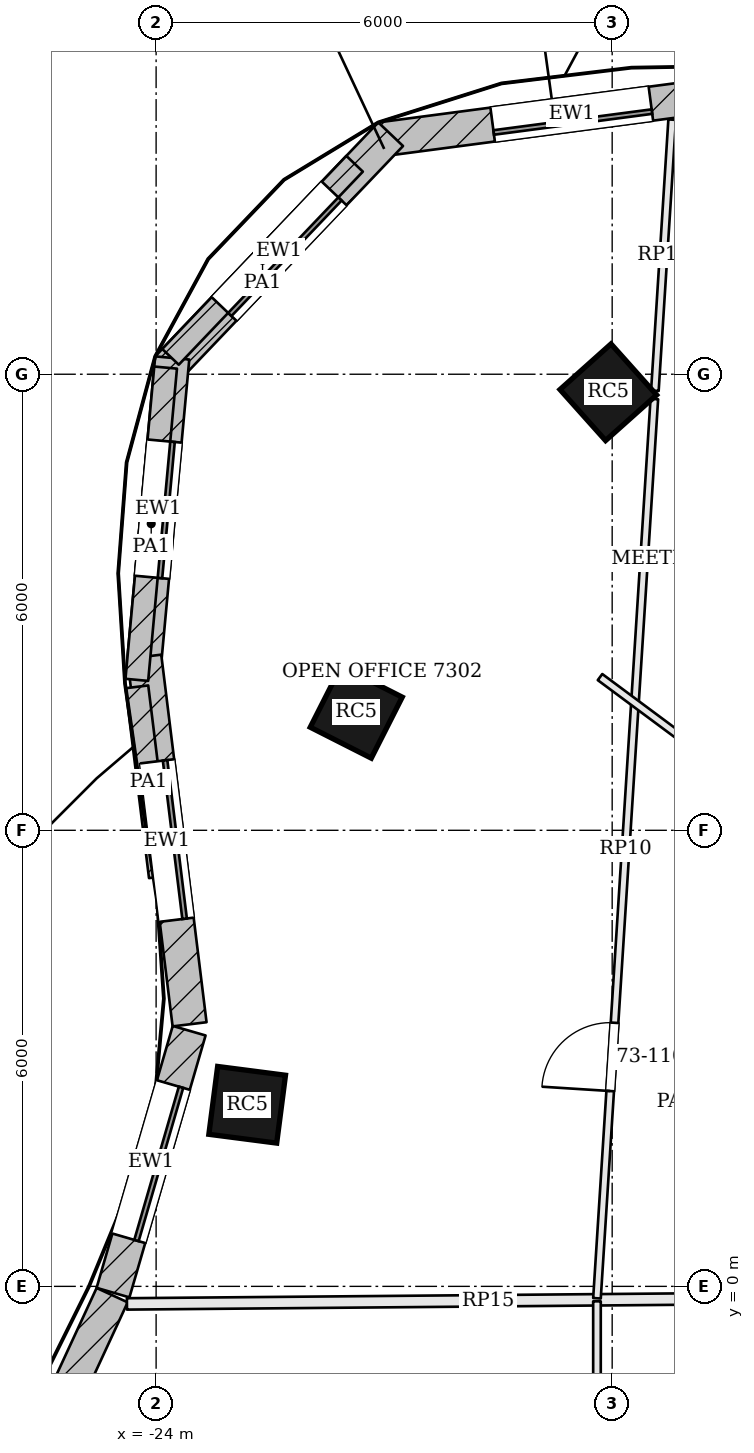
"""IFC4 building model, lengths in metres.
Left out: names, types, materials, properties, quantities, classifications, styles, units other than length and angle.
Written with IfcOpenShell. Run it as: python <this file> out.ifc"""

import sys

from ifc_helpers import new_model, si_unit, direction, frame, frame_2d, origin, origin_2d, place, context, subcontext, project, spatial, rectangle, extrude, element, fill, save


model = new_model("IFC4")
c1 = context("Model", 3, precision=1e-05, world=origin(), true_north=direction((0.0, 1.0)))
c2 = subcontext(c1, "Body", "Model", "MODEL_VIEW")
j1 = project(units=[si_unit("LENGTHUNIT", "METRE"), si_unit("PLANEANGLEUNIT", "RADIAN")], contexts=[c1])
p1 = place(None, origin())
s1 = spatial("IfcSite", under=j1, at=p1, CompositionType="ELEMENT")
p2 = place(p1, origin())
s2 = spatial("IfcBuilding", under=s1, at=p2, CompositionType="ELEMENT")
p3 = place(p2, frame((0.0, 0.0, 296.1)))
s3 = spatial("IfcBuildingStorey", under=s2, at=p3, CompositionType="ELEMENT", Elevation=296.1)
for number, where, z_axis, x_axis in (
    (1, (-18.051, 11.763, 0.0), (0.0, 0.0, 1.0), (-0.746, -0.666, 0.0)),
    (2, (-21.367, 7.554, 0.0), (0.0, 0.0, 1.0), (-0.452, -0.892, 0.0)),
    (3, (-22.802, 2.389, 0.0), (0.0, 0.0, 1.0), (-0.129, -0.992, 0.0)),
):
    element("IfcColumn", number, at=place(p3, frame(where, z_axis=z_axis, x_axis=x_axis)), inside=s3, PredefinedType="COLUMN", context=c2, shape_type="SweptSolid", body=[
        extrude(rectangle(XDim=0.9, YDim=0.9, at=origin_2d()), origin(), (0.0, 0.0, 1.0), 3.9),
    ])
p4 = place(p3, frame((-16.019, 15.753, 0.0), z_axis=(0.0, 0.0, 1.0), x_axis=(-0.991409967396, -0.130790965086, 0.0)))
e4 = element("IfcWall", 4, at=p4, inside=s3, PredefinedType="SOLIDWALL", context=c2, shape_type="SweptSolid", body=[
    extrude(rectangle(XDim=5.068, YDim=0.45, at=frame_2d((2.534, 0.0))), origin(), (0.0, 0.0, 1.0), 3.7),
])
p5 = place(p4, frame((1.484, 0.0, 0.9)))
e5 = element("IfcOpeningElement", 5, at=p5, cuts=e4, PredefinedType="OPENING", context=c2, shape_type="SweptSolid", body=[
    extrude(rectangle(XDim=2.1, YDim=2.3, at=frame_2d((1.05, 1.15))), frame((0.0, 0.235, 0.0), z_axis=(0.0, -1.0, 0.0), x_axis=(1.0, 0.0, 0.0)), (0.0, 0.0, 1.0), 0.47),
])
p6 = place(p3, frame((-20.914, 15.158, 0.0), z_axis=(0.0, 0.0, 1.0), x_axis=(-0.690057851873, -0.723754213161, 0.0)))
e6 = element("IfcWall", 6, at=p6, inside=s3, PredefinedType="SOLIDWALL", context=c2, shape_type="SweptSolid", body=[
    extrude(rectangle(XDim=4.253, YDim=0.45, at=frame_2d((2.126, 0.0))), origin(), (0.0, 0.0, 1.0), 3.7),
])
p7 = place(p6, frame((1.076, 0.0, 0.9)))
e7 = element("IfcOpeningElement", 7, at=p7, cuts=e6, PredefinedType="OPENING", context=c2, shape_type="SweptSolid", body=[
    extrude(rectangle(XDim=2.1, YDim=2.3, at=frame_2d((1.05, 1.15))), frame((0.0, 0.235, 0.0), z_axis=(0.0, -1.0, 0.0), x_axis=(1.0, 0.0, 0.0)), (0.0, 0.0, 1.0), 0.47),
])
p8 = place(p3, frame((-23.788, 12.214, 0.0), z_axis=(0.0, 0.0, 1.0), x_axis=(-0.091885237351, -0.995769603451, 0.0)))
e8 = element("IfcWall", 8, at=p8, inside=s3, PredefinedType="SOLIDWALL", context=c2, shape_type="SweptSolid", body=[
    extrude(rectangle(XDim=3.996, YDim=0.45, at=frame_2d((1.998, 0.0))), origin(), (0.0, 0.0, 1.0), 3.7),
])
p9 = place(p8, frame((1.098, 0.0, 0.9)))
e9 = element("IfcOpeningElement", 9, at=p9, cuts=e8, PredefinedType="OPENING", context=c2, shape_type="SweptSolid", body=[
    extrude(rectangle(XDim=1.8, YDim=2.3, at=frame_2d((0.9, 1.15))), frame((0.0, 0.235, 0.0), z_axis=(0.0, -1.0, 0.0), x_axis=(1.0, 0.0, 0.0)), (0.0, 0.0, 1.0), 0.47),
])
p10 = place(p3, frame((-24.156, 8.283, 0.0), z_axis=(0.0, 0.0, 1.0), x_axis=(0.122319995681, -0.992490714645, 0.0)))
e10 = element("IfcWall", 10, at=p10, inside=s3, PredefinedType="SOLIDWALL", context=c2, shape_type="SweptSolid", body=[
    extrude(rectangle(XDim=4.872, YDim=0.45, at=frame_2d((2.436, 0.0))), origin(), (0.0, 0.0, 1.0), 3.7),
])
p11 = place(p10, frame((1.386, 0.0, 0.9)))
e11 = element("IfcOpeningElement", 11, at=p11, cuts=e10, PredefinedType="OPENING", context=c2, shape_type="SweptSolid", body=[
    extrude(rectangle(XDim=2.1, YDim=2.3, at=frame_2d((1.05, 1.15))), frame((0.0, 0.235, 0.0), z_axis=(0.0, -1.0, 0.0), x_axis=(1.0, 0.0, 0.0)), (0.0, 0.0, 1.0), 0.47),
])
p12 = place(p3, frame((-23.565, 3.364, 0.0), z_axis=(0.0, 0.0, 1.0), x_axis=(-0.279148198653, -0.960248032119, 0.0)))
e12 = element("IfcWall", 12, at=p12, inside=s3, PredefinedType="SOLIDWALL", context=c2, shape_type="SweptSolid", body=[
    extrude(rectangle(XDim=3.588, YDim=0.45, at=frame_2d((1.794, 0.0))), origin(), (0.0, 0.0, 1.0), 3.7),
])
p13 = place(p12, frame((0.744, 0.0, 0.9)))
e13 = element("IfcOpeningElement", 13, at=p13, cuts=e12, PredefinedType="OPENING", context=c2, shape_type="SweptSolid", body=[
    extrude(rectangle(XDim=2.1, YDim=2.3, at=frame_2d((1.05, 1.15))), frame((0.0, 0.235, 0.0), z_axis=(0.0, -1.0, 0.0), x_axis=(1.0, 0.0, 0.0)), (0.0, 0.0, 1.0), 0.47),
])
p14 = place(p3, frame((-24.579, -0.115, 0.0), z_axis=(0.0, 0.0, 1.0), x_axis=(-0.419535648317, -0.907738861012, 0.0)))
e14 = element("IfcWall", 14, at=p14, inside=s3, PredefinedType="SOLIDWALL", context=c2, shape_type="SweptSolid", body=[
    extrude(rectangle(XDim=4.636, YDim=0.45, at=frame_2d((2.318, 0.0))), origin(), (0.0, 0.0, 1.0), 3.7),
])
p15 = place(p14, frame((1.268, 0.0, 0.9)))
e15 = element("IfcOpeningElement", 15, at=p15, cuts=e14, PredefinedType="OPENING", context=c2, shape_type="SweptSolid", body=[
    extrude(rectangle(XDim=2.1, YDim=2.3, at=frame_2d((1.05, 1.15))), frame((0.0, 0.235, 0.0), z_axis=(0.0, -1.0, 0.0), x_axis=(1.0, 0.0, 0.0)), (0.0, 0.0, 1.0), 0.47),
])
p16 = place(p3, frame((-21.388, 14.769, 3.9), z_axis=(0.0, 0.0, 1.0), x_axis=(-0.690144808601, -0.723671294969, 0.0)))
e16 = element("IfcWall", 16, at=p16, inside=s3, PredefinedType="PARAPET", context=c2, shape_type="SweptSolid", body=[
    extrude(rectangle(XDim=3.51, YDim=0.3, at=frame_2d((1.755, 0.0))), origin(), (0.0, 0.0, 1.0), 1.1),
])
p17 = place(p3, frame((-23.875, 12.087, 3.9), z_axis=(0.0, 0.0, 1.0), x_axis=(-0.091842900475, -0.995773509204, 0.0)))
e17 = element("IfcWall", 17, at=p17, inside=s3, PredefinedType="PARAPET", context=c2, shape_type="SweptSolid", body=[
    extrude(rectangle(XDim=4.125, YDim=0.3, at=frame_2d((2.063, 0.0))), origin(), (0.0, 0.0, 1.0), 1.1),
])
p18 = place(p3, frame((-24.252, 7.887, 3.9), z_axis=(0.0, 0.0, 1.0), x_axis=(0.122315432018, -0.992491277085, 0.0)))
e18 = element("IfcWall", 18, at=p18, inside=s3, PredefinedType="PARAPET", context=c2, shape_type="SweptSolid", body=[
    extrude(rectangle(XDim=2.517, YDim=0.3, at=frame_2d((1.258, 0.0))), origin(), (0.0, 0.0, 1.0), 1.1),
])
p19 = place(p3, frame((-24.384, -0.231, 0.0), z_axis=(0.0, 0.0, 1.0), x_axis=(0.999962123102, 0.008703583232, 0.0)))
e19 = element("IfcWall", 19, at=p19, inside=s3, PredefinedType="PARTITIONING", context=c2, shape_type="SweptSolid", body=[
    extrude(rectangle(XDim=9.509, YDim=0.15, at=frame_2d((4.754, 0.0))), origin(), (0.0, 0.0, 1.0), 3.234),
])
p20 = place(p3, frame((-18.2, -0.157, 0.0), z_axis=(0.0, 0.0, 1.0), x_axis=(0.063656514624, 0.997971867412, 0.0)))
e20 = element("IfcWall", 20, at=p20, inside=s3, PredefinedType="PARTITIONING", context=c2, shape_type="SweptSolid", body=[
    extrude(rectangle(XDim=11.855, YDim=0.1, at=frame_2d((5.927, 0.0))), origin(), (0.0, 0.0, 1.0), 3.184),
])
p21 = place(p20, frame((2.732, 0.0, 0.0)))
e21 = element("IfcOpeningElement", 21, at=p21, cuts=e20, PredefinedType="OPENING", context=c2, shape_type="SweptSolid", body=[
    extrude(rectangle(XDim=0.9, YDim=2.1, at=frame_2d((0.45, 1.05))), frame((0.0, 0.06, 0.0), z_axis=(0.0, -1.0, 0.0), x_axis=(1.0, 0.0, 0.0)), (0.0, 0.0, 1.0), 0.12),
])
p22 = place(p3, frame((-17.438, 11.783, 0.0), z_axis=(0.0, 0.0, 1.0), x_axis=(0.063671201207, 0.997970930507, 0.0)))
e22 = element("IfcWall", 22, at=p22, inside=s3, PredefinedType="PARTITIONING", context=c2, shape_type="SweptSolid", body=[
    extrude(rectangle(XDim=3.574, YDim=0.1, at=frame_2d((1.787, 0.0))), origin(), (0.0, 0.0, 1.0), 3.184),
])
p23 = place(p3, frame((-14.86, 5.567, 0.0), z_axis=(0.0, 0.0, 1.0), x_axis=(-0.803012729879, 0.595961874328, 0.0)))
e23 = element("IfcWall", 23, at=p23, inside=s3, PredefinedType="PARTITIONING", context=c2, shape_type="SweptSolid", body=[
    extrude(rectangle(XDim=4.109, YDim=0.1, at=frame_2d((2.055, 0.0))), origin(), (0.0, 0.0, 1.0), 3.184),
])
p24 = place(p3, frame((-18.2, -8.2, 0.0), z_axis=(0.0, 0.0, 1.0), x_axis=(0.0, 1.0, 0.0)))
e24 = element("IfcWall", 24, at=p24, inside=s3, PredefinedType="PARTITIONING", context=c2, shape_type="SweptSolid", body=[
    extrude(rectangle(XDim=8.003, YDim=0.1, at=frame_2d((4.001, 0.0))), origin(), (0.0, 0.0, 1.0), 3.184),
])
p25 = place(p24, frame((5.355, 0.0, 0.0)))
e25 = element("IfcOpeningElement", 25, at=p25, cuts=e24, PredefinedType="OPENING", context=c2, shape_type="SweptSolid", body=[
    extrude(rectangle(XDim=1.0, YDim=2.1, at=frame_2d((0.5, 1.05))), frame((0.0, 0.06, 0.0), z_axis=(0.0, -1.0, 0.0), x_axis=(1.0, 0.0, 0.0)), (0.0, 0.0, 1.0), 0.12),
])
p26 = place(p5, origin())
e26 = element("IfcWindow", 26, at=p26, inside=s3, PartitioningType="SINGLE_PANEL", PredefinedType="WINDOW", context=c2, shape_type="SweptSolid", body=[
    extrude(rectangle(XDim=2.1, YDim=2.3, at=frame_2d((1.05, 1.15))), frame((0.0, 0.135, 0.0), z_axis=(0.0, -1.0, 0.0), x_axis=(1.0, 0.0, 0.0)), (0.0, 0.0, 1.0), 0.06),
])
fill(e5, e26)
p27 = place(p7, origin())
e27 = element("IfcWindow", 27, at=p27, inside=s3, PartitioningType="SINGLE_PANEL", PredefinedType="WINDOW", context=c2, shape_type="SweptSolid", body=[
    extrude(rectangle(XDim=2.1, YDim=2.3, at=frame_2d((1.05, 1.15))), frame((0.0, 0.135, 0.0), z_axis=(0.0, -1.0, 0.0), x_axis=(1.0, 0.0, 0.0)), (0.0, 0.0, 1.0), 0.06),
])
fill(e7, e27)
p28 = place(p9, origin())
e28 = element("IfcWindow", 28, at=p28, inside=s3, PartitioningType="SINGLE_PANEL", PredefinedType="WINDOW", context=c2, shape_type="SweptSolid", body=[
    extrude(rectangle(XDim=1.8, YDim=2.3, at=frame_2d((0.9, 1.15))), frame((0.0, 0.135, 0.0), z_axis=(0.0, -1.0, 0.0), x_axis=(1.0, 0.0, 0.0)), (0.0, 0.0, 1.0), 0.06),
])
fill(e9, e28)
p29 = place(p11, origin())
e29 = element("IfcWindow", 29, at=p29, inside=s3, PartitioningType="SINGLE_PANEL", PredefinedType="WINDOW", context=c2, shape_type="SweptSolid", body=[
    extrude(rectangle(XDim=2.1, YDim=2.3, at=frame_2d((1.05, 1.15))), frame((0.0, 0.135, 0.0), z_axis=(0.0, -1.0, 0.0), x_axis=(1.0, 0.0, 0.0)), (0.0, 0.0, 1.0), 0.06),
])
fill(e11, e29)
p30 = place(p13, origin())
e30 = element("IfcWindow", 30, at=p30, inside=s3, PartitioningType="SINGLE_PANEL", PredefinedType="WINDOW", context=c2, shape_type="SweptSolid", body=[
    extrude(rectangle(XDim=2.1, YDim=2.3, at=frame_2d((1.05, 1.15))), frame((0.0, 0.135, 0.0), z_axis=(0.0, -1.0, 0.0), x_axis=(1.0, 0.0, 0.0)), (0.0, 0.0, 1.0), 0.06),
])
fill(e13, e30)
p31 = place(p21, origin())
e31 = element("IfcDoor", 31, at=p31, inside=s3, OperationType="SINGLE_SWING_LEFT", PredefinedType="DOOR", context=c2, shape_type="SweptSolid", body=[
    extrude(rectangle(XDim=0.9, YDim=2.1, at=frame_2d((0.45, 1.05))), frame((0.0, 0.025, 0.0), z_axis=(0.0, -1.0, 0.0), x_axis=(1.0, 0.0, 0.0)), (0.0, 0.0, 1.0), 0.05),
])
fill(e21, e31)
save(model, sys.argv[1])
